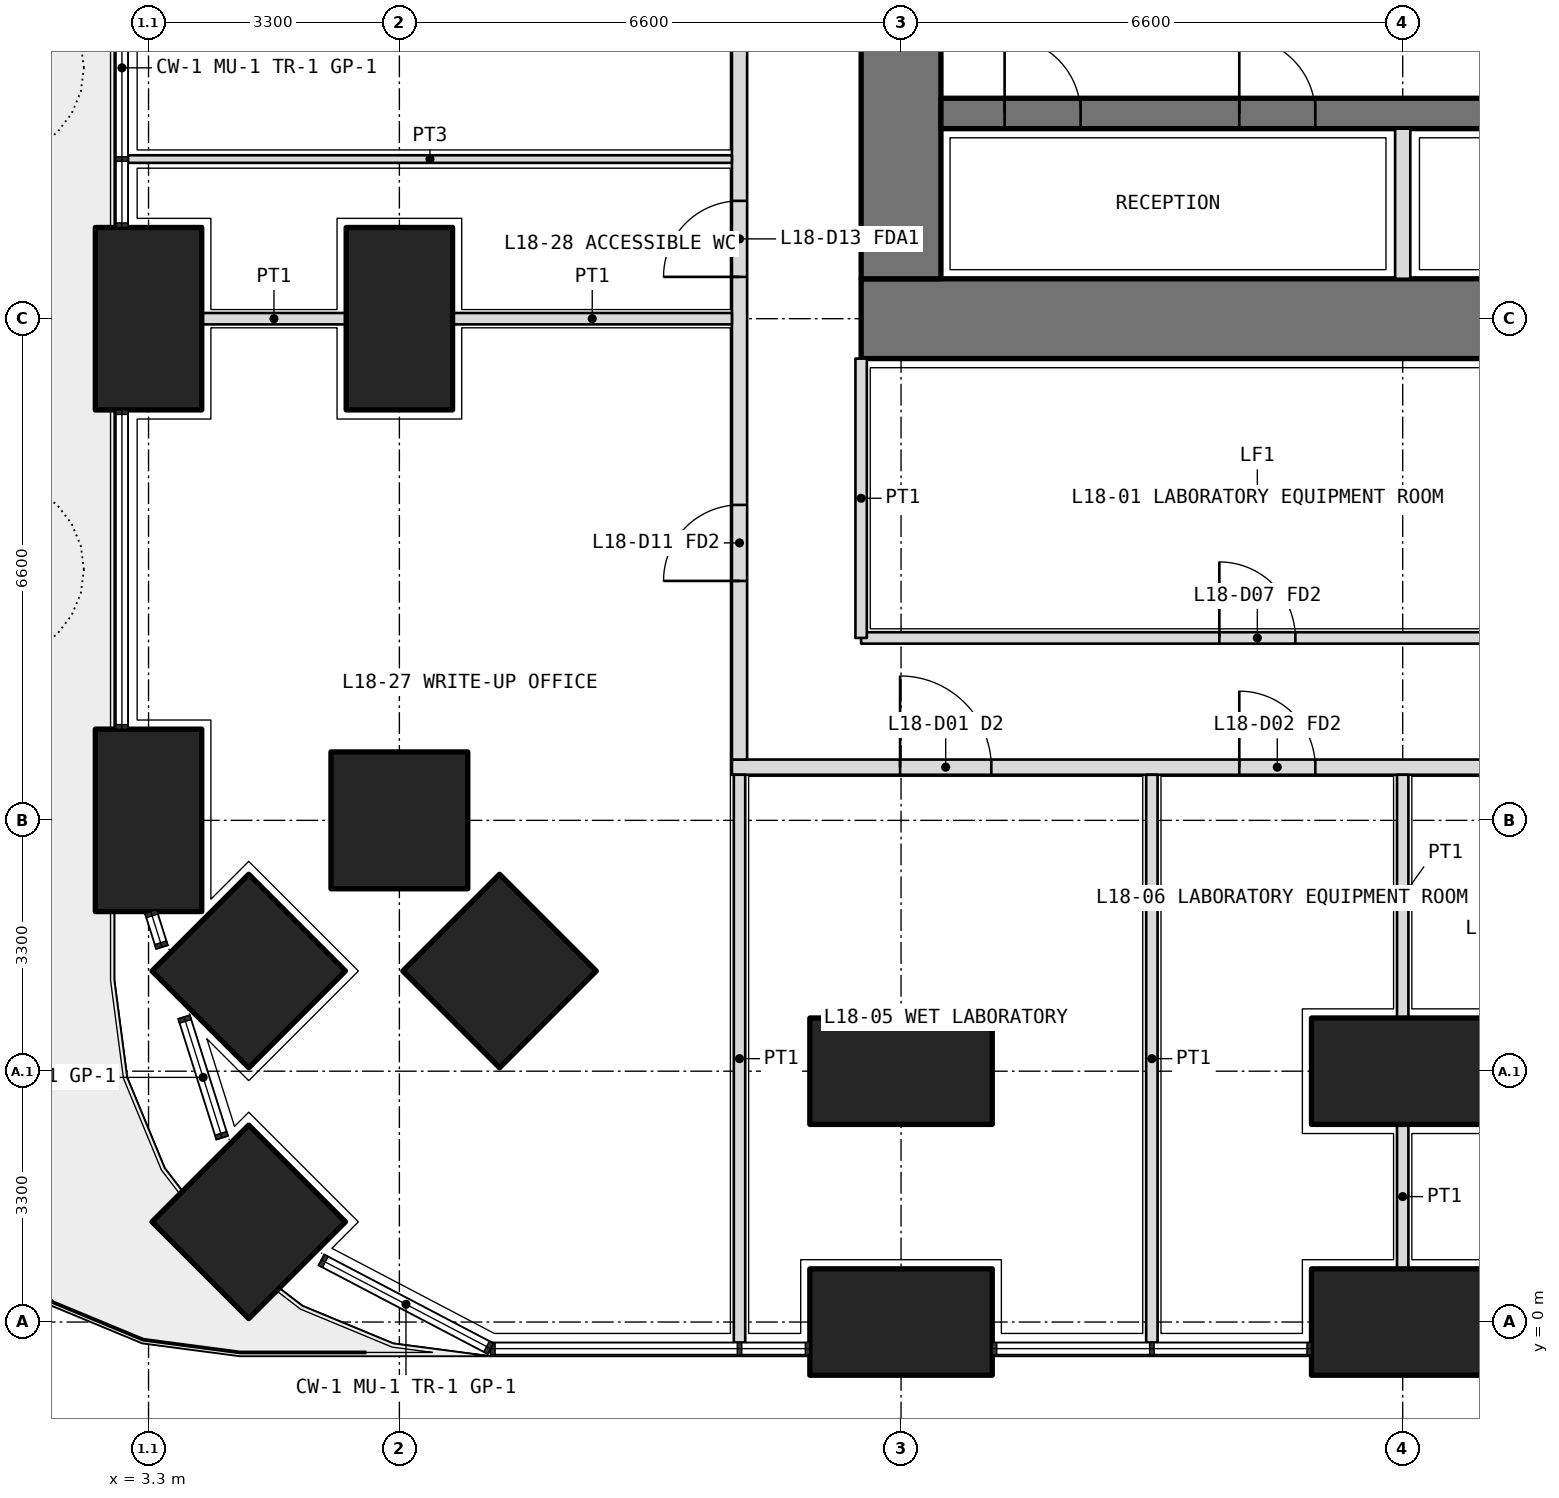
"""IFC4 building model, lengths in metres.
Left out: names, types, materials, properties, quantities, classifications, styles, units other than length and angle.
Written with IfcOpenShell. Run it as: python <this file> out.ifc"""

import sys

from ifc_helpers import new_model, si_unit, direction, frame, frame_2d, origin, origin_2d, place, context, subcontext, project, spatial, rectangle, extrude, element, fill, save


model = new_model("IFC4")
c1 = context("Model", 3, precision=1e-05, world=origin(), true_north=direction((0.0, 1.0)))
c2 = subcontext(c1, "Body", "Model", "MODEL_VIEW")
j1 = project(units=[si_unit("LENGTHUNIT", "METRE"), si_unit("PLANEANGLEUNIT", "RADIAN")], contexts=[c1])
p1 = place(None, origin())
s1 = spatial("IfcSite", under=j1, at=p1, CompositionType="ELEMENT")
p2 = place(p1, origin())
s2 = spatial("IfcBuilding", under=s1, at=p2, CompositionType="ELEMENT")
p3 = place(p2, frame((0.0, 0.0, 82.2)))
s3 = spatial("IfcBuildingStorey", under=s2, at=p3, CompositionType="ELEMENT", Elevation=82.2)
p4 = place(p3, frame((4.618, 1.318, 0.0), z_axis=(0.0, 0.0, 1.0), x_axis=(0.707106781187, 0.707106781187, 0.0)))
e1 = element("IfcColumn", 1, at=p4, inside=s3, PredefinedType="COLUMN", context=c2, shape_type="SweptSolid", body=[
    extrude(rectangle(XDim=1.8, YDim=1.8, at=origin_2d()), origin(), (0.0, 0.0, 1.0), 4.2),
])
for number, where, z_axis, x_axis in (
    (2, (13.2, 0.0, 0.0), (0.0, 0.0, 1.0), (1.0, 0.0, 0.0)),
    (3, (19.8, 0.0, 0.0), (0.0, 0.0, 1.0), (1.0, 0.0, 0.0)),
    (4, (3.3, 6.6, 0.0), (0.0, 0.0, 1.0), (0.0, 1.0, 0.0)),
    (5, (3.3, 13.2, 0.0), (0.0, 0.0, 1.0), (0.0, 1.0, 0.0)),
):
    element("IfcColumn", number, at=place(p3, frame(where, z_axis=z_axis, x_axis=x_axis)), inside=s3, PredefinedType="COLUMN", context=c2, shape_type="SweptSolid", body=[
        extrude(rectangle(XDim=2.4, YDim=1.4, at=origin_2d()), origin(), (0.0, 0.0, 1.0), 4.2),
    ])
for number, where, z_axis, x_axis in (
    (6, (6.6, 6.6, 0.0), (0.0, 0.0, 1.0), (1.0, 0.0, 0.0)),
    (7, (4.618, 4.618, 0.0), (0.0, 0.0, 1.0), (0.707, 0.707, 0.0)),
):
    element("IfcColumn", number, at=place(p3, frame(where, z_axis=z_axis, x_axis=x_axis)), inside=s3, PredefinedType="COLUMN", context=c2, shape_type="SweptSolid", body=[
        extrude(rectangle(XDim=1.8, YDim=1.8, at=origin_2d()), origin(), (0.0, 0.0, 1.0), 4.2),
    ])
for number, where, z_axis, x_axis in (
    (8, (13.2, 3.3, 0.0), (0.0, 0.0, 1.0), (1.0, 0.0, 0.0)),
    (9, (19.8, 3.3, 0.0), (0.0, 0.0, 1.0), (1.0, 0.0, 0.0)),
):
    element("IfcColumn", number, at=place(p3, frame(where, z_axis=z_axis, x_axis=x_axis)), inside=s3, PredefinedType="COLUMN", context=c2, shape_type="SweptSolid", body=[
        extrude(rectangle(XDim=2.4, YDim=1.4, at=origin_2d()), origin(), (0.0, 0.0, 1.0), 4.2),
    ])
p5 = place(p3, frame((7.918, 4.618, 0.0), z_axis=(0.0, 0.0, 1.0), x_axis=(0.707106781187, 0.707106781187, 0.0)))
e10 = element("IfcColumn", 10, at=p5, inside=s3, PredefinedType="COLUMN", context=c2, shape_type="SweptSolid", body=[
    extrude(rectangle(XDim=1.8, YDim=1.8, at=origin_2d()), origin(), (0.0, 0.0, 1.0), 4.2),
])
p6 = place(p3, frame((6.6, 13.2, 0.0), z_axis=(0.0, 0.0, 1.0), x_axis=(0.0, 1.0, 0.0)))
e11 = element("IfcColumn", 11, at=p6, inside=s3, PredefinedType="COLUMN", context=c2, shape_type="SweptSolid", body=[
    extrude(rectangle(XDim=2.4, YDim=1.4, at=origin_2d()), origin(), (0.0, 0.0, 1.0), 4.2),
])
p7 = place(p3, frame((12.675, 13.2, 0.0), z_axis=(0.0, 0.0, 1.0), x_axis=(1.0, 0.0, 0.0)))
e12 = element("IfcWall", 12, at=p7, inside=s3, PredefinedType="SHEAR", context=c2, shape_type="SweptSolid", body=[
    extrude(rectangle(XDim=27.45, YDim=1.05, at=frame_2d((13.725, 0.0))), origin(), (0.0, 0.0, 1.0), 4.2),
])
p8 = place(p3, frame((13.2, 32.475, 0.0), z_axis=(0.0, 0.0, 1.0), x_axis=(0.0, -1.0, 0.0)))
e13 = element("IfcWall", 13, at=p8, inside=s3, PredefinedType="SHEAR", context=c2, shape_type="SweptSolid", body=[
    extrude(rectangle(XDim=18.75, YDim=1.05, at=frame_2d((9.375, 0.0))), origin(), (0.0, 0.0, 1.0), 4.2),
])
p9 = place(p8, frame((14.125, 0.0, 0.0)))
e14 = element("IfcOpeningElement", 14, at=p9, cuts=e13, PredefinedType="OPENING", context=c2, shape_type="SweptSolid", body=[
    extrude(rectangle(XDim=1.6, YDim=2.1, at=frame_2d((0.8, 1.05))), frame((0.0, 0.535, 0.0), z_axis=(0.0, -1.0, 0.0), x_axis=(1.0, 0.0, 0.0)), (0.0, 0.0, 1.0), 1.07),
])
p10 = place(p8, frame((3.325, 0.0, 0.0)))
e15 = element("IfcOpeningElement", 15, at=p10, cuts=e13, PredefinedType="OPENING", context=c2, shape_type="SweptSolid", body=[
    extrude(rectangle(XDim=1.6, YDim=2.1, at=frame_2d((0.8, 1.05))), frame((0.0, 0.535, 0.0), z_axis=(0.0, -1.0, 0.0), x_axis=(1.0, 0.0, 0.0)), (0.0, 0.0, 1.0), 1.07),
])
p11 = place(p3, frame((13.725, 15.9, 0.0), z_axis=(0.0, 0.0, 1.0), x_axis=(1.0, 0.0, 0.0)))
e16 = element("IfcWall", 16, at=p11, inside=s3, PredefinedType="SHEAR", context=c2, shape_type="SweptSolid", body=[
    extrude(rectangle(XDim=25.35, YDim=0.4, at=frame_2d((12.675, 0.0))), origin(), (0.0, 0.0, 1.0), 4.2),
])
p12 = place(p11, frame((0.837, 0.0, 0.0)))
e17 = element("IfcOpeningElement", 17, at=p12, cuts=e16, PredefinedType="OPENING", context=c2, shape_type="SweptSolid", body=[
    extrude(rectangle(XDim=1.0, YDim=2.1, at=frame_2d((0.5, 1.05))), frame((0.0, 0.21, 0.0), z_axis=(0.0, -1.0, 0.0), x_axis=(1.0, 0.0, 0.0)), (0.0, 0.0, 1.0), 0.42),
])
p13 = place(p11, frame((3.925, 0.0, 0.0)))
e18 = element("IfcOpeningElement", 18, at=p13, cuts=e16, PredefinedType="OPENING", context=c2, shape_type="SweptSolid", body=[
    extrude(rectangle(XDim=1.0, YDim=2.1, at=frame_2d((0.5, 1.05))), frame((0.0, 0.21, 0.0), z_axis=(0.0, -1.0, 0.0), x_axis=(1.0, 0.0, 0.0)), (0.0, 0.0, 1.0), 0.42),
])
p14 = place(p11, frame((7.225, 0.0, 0.0)))
e19 = element("IfcOpeningElement", 19, at=p14, cuts=e16, PredefinedType="OPENING", context=c2, shape_type="SweptSolid", body=[
    extrude(rectangle(XDim=1.0, YDim=2.1, at=frame_2d((0.5, 1.05))), frame((0.0, 0.21, 0.0), z_axis=(0.0, -1.0, 0.0), x_axis=(1.0, 0.0, 0.0)), (0.0, 0.0, 1.0), 0.42),
])
p15 = place(p11, frame((10.525, 0.0, 0.0)))
e20 = element("IfcOpeningElement", 20, at=p15, cuts=e16, PredefinedType="OPENING", context=c2, shape_type="SweptSolid", body=[
    extrude(rectangle(XDim=1.0, YDim=2.1, at=frame_2d((0.5, 1.05))), frame((0.0, 0.21, 0.0), z_axis=(0.0, -1.0, 0.0), x_axis=(1.0, 0.0, 0.0)), (0.0, 0.0, 1.0), 0.42),
])
p16 = place(p11, frame((13.775, 0.0, 0.0)))
e21 = element("IfcOpeningElement", 21, at=p16, cuts=e16, PredefinedType="OPENING", context=c2, shape_type="SweptSolid", body=[
    extrude(rectangle(XDim=1.1, YDim=2.1, at=frame_2d((0.55, 1.05))), frame((0.0, 0.21, 0.0), z_axis=(0.0, -1.0, 0.0), x_axis=(1.0, 0.0, 0.0)), (0.0, 0.0, 1.0), 0.42),
])
p17 = place(p11, frame((17.075, 0.0, 0.0)))
e22 = element("IfcOpeningElement", 22, at=p17, cuts=e16, PredefinedType="OPENING", context=c2, shape_type="SweptSolid", body=[
    extrude(rectangle(XDim=1.1, YDim=2.1, at=frame_2d((0.55, 1.05))), frame((0.0, 0.21, 0.0), z_axis=(0.0, -1.0, 0.0), x_axis=(1.0, 0.0, 0.0)), (0.0, 0.0, 1.0), 0.42),
])
p18 = place(p11, frame((20.375, 0.0, 0.0)))
e23 = element("IfcOpeningElement", 23, at=p18, cuts=e16, PredefinedType="OPENING", context=c2, shape_type="SweptSolid", body=[
    extrude(rectangle(XDim=1.1, YDim=2.1, at=frame_2d((0.55, 1.05))), frame((0.0, 0.21, 0.0), z_axis=(0.0, -1.0, 0.0), x_axis=(1.0, 0.0, 0.0)), (0.0, 0.0, 1.0), 0.42),
])
p19 = place(p11, frame((23.462, 0.0, 0.0)))
e24 = element("IfcOpeningElement", 24, at=p19, cuts=e16, PredefinedType="OPENING", context=c2, shape_type="SweptSolid", body=[
    extrude(rectangle(XDim=1.1, YDim=2.1, at=frame_2d((0.55, 1.05))), frame((0.0, 0.21, 0.0), z_axis=(0.0, -1.0, 0.0), x_axis=(1.0, 0.0, 0.0)), (0.0, 0.0, 1.0), 0.42),
])
p20 = place(p3, frame((19.8, 13.725, 0.0), z_axis=(0.0, 0.0, 1.0), x_axis=(0.0, 1.0, 0.0)))
e25 = element("IfcWall", 25, at=p20, inside=s3, PredefinedType="PARTITIONING", context=c2, shape_type="SweptSolid", body=[
    extrude(rectangle(XDim=1.975, YDim=0.2, at=frame_2d((0.987, 0.0))), origin(), (0.0, 0.0, 1.0), 4.2),
])
p21 = place(p3, frame((12.675, 9.0, 0.0), z_axis=(0.0, 0.0, 1.0), x_axis=(1.0, 0.0, 0.0)))
e26 = element("IfcWall", 26, at=p21, inside=s3, PredefinedType="PARTITIONING", context=c2, shape_type="SweptSolid", body=[
    extrude(rectangle(XDim=27.45, YDim=0.15, at=frame_2d((13.725, 0.0))), origin(), (0.0, 0.0, 1.0), 2.85),
])
p22 = place(p21, frame((4.712, 0.0, 0.0)))
e27 = element("IfcOpeningElement", 27, at=p22, cuts=e26, PredefinedType="OPENING", context=c2, shape_type="SweptSolid", body=[
    extrude(rectangle(XDim=1.0, YDim=2.1, at=frame_2d((0.5, 1.05))), frame((0.0, 0.085, 0.0), z_axis=(0.0, -1.0, 0.0), x_axis=(1.0, 0.0, 0.0)), (0.0, 0.0, 1.0), 0.17),
])
p23 = place(p21, frame((11.575, 0.0, 0.0)))
e28 = element("IfcOpeningElement", 28, at=p23, cuts=e26, PredefinedType="OPENING", context=c2, shape_type="SweptSolid", body=[
    extrude(rectangle(XDim=1.0, YDim=2.1, at=frame_2d((0.5, 1.05))), frame((0.0, 0.085, 0.0), z_axis=(0.0, -1.0, 0.0), x_axis=(1.0, 0.0, 0.0)), (0.0, 0.0, 1.0), 0.17),
])
p24 = place(p21, frame((18.175, 0.0, 0.0)))
e29 = element("IfcOpeningElement", 29, at=p24, cuts=e26, PredefinedType="OPENING", context=c2, shape_type="SweptSolid", body=[
    extrude(rectangle(XDim=1.0, YDim=2.1, at=frame_2d((0.5, 1.05))), frame((0.0, 0.085, 0.0), z_axis=(0.0, -1.0, 0.0), x_axis=(1.0, 0.0, 0.0)), (0.0, 0.0, 1.0), 0.17),
])
p25 = place(p21, frame((25.038, 0.0, 0.0)))
e30 = element("IfcOpeningElement", 30, at=p25, cuts=e26, PredefinedType="OPENING", context=c2, shape_type="SweptSolid", body=[
    extrude(rectangle(XDim=1.0, YDim=2.1, at=frame_2d((0.5, 1.05))), frame((0.0, 0.085, 0.0), z_axis=(0.0, -1.0, 0.0), x_axis=(1.0, 0.0, 0.0)), (0.0, 0.0, 1.0), 0.17),
])
p26 = place(p3, frame((12.675, 12.675, 0.0), z_axis=(0.0, 0.0, 1.0), x_axis=(0.0, -1.0, 0.0)))
e31 = element("IfcWall", 31, at=p26, inside=s3, PredefinedType="PARTITIONING", context=c2, shape_type="SweptSolid", body=[
    extrude(rectangle(XDim=3.675, YDim=0.15, at=frame_2d((1.837, 0.0))), origin(), (0.0, 0.0, 1.0), 2.85),
])
p27 = place(p3, frame((10.975, 7.3, 0.0), z_axis=(0.0, 0.0, 1.0), x_axis=(1.0, 0.0, 0.0)))
e32 = element("IfcWall", 32, at=p27, inside=s3, PredefinedType="PARTITIONING", context=c2, shape_type="SweptSolid", body=[
    extrude(rectangle(XDim=30.85, YDim=0.2, at=frame_2d((15.425, 0.0))), origin(), (0.0, 0.0, 1.0), 2.85),
])
p28 = place(p27, frame((2.212, 0.0, 0.0)))
e33 = element("IfcOpeningElement", 33, at=p28, cuts=e32, PredefinedType="OPENING", context=c2, shape_type="SweptSolid", body=[
    extrude(rectangle(XDim=1.2, YDim=2.1, at=frame_2d((0.6, 1.05))), frame((0.0, 0.11, 0.0), z_axis=(0.0, -1.0, 0.0), x_axis=(1.0, 0.0, 0.0)), (0.0, 0.0, 1.0), 0.22),
])
p29 = place(p27, frame((6.675, 0.0, 0.0)))
e34 = element("IfcOpeningElement", 34, at=p29, cuts=e32, PredefinedType="OPENING", context=c2, shape_type="SweptSolid", body=[
    extrude(rectangle(XDim=1.0, YDim=2.1, at=frame_2d((0.5, 1.05))), frame((0.0, 0.11, 0.0), z_axis=(0.0, -1.0, 0.0), x_axis=(1.0, 0.0, 0.0)), (0.0, 0.0, 1.0), 0.22),
])
p30 = place(p27, frame((10.425, 0.0, 0.0)))
e35 = element("IfcOpeningElement", 35, at=p30, cuts=e32, PredefinedType="OPENING", context=c2, shape_type="SweptSolid", body=[
    extrude(rectangle(XDim=1.0, YDim=2.1, at=frame_2d((0.5, 1.05))), frame((0.0, 0.11, 0.0), z_axis=(0.0, -1.0, 0.0), x_axis=(1.0, 0.0, 0.0)), (0.0, 0.0, 1.0), 0.22),
])
p31 = place(p27, frame((13.725, 0.0, 0.0)))
e36 = element("IfcOpeningElement", 36, at=p31, cuts=e32, PredefinedType="OPENING", context=c2, shape_type="SweptSolid", body=[
    extrude(rectangle(XDim=1.0, YDim=2.1, at=frame_2d((0.5, 1.05))), frame((0.0, 0.11, 0.0), z_axis=(0.0, -1.0, 0.0), x_axis=(1.0, 0.0, 0.0)), (0.0, 0.0, 1.0), 0.22),
])
p32 = place(p27, frame((16.475, 0.0, 0.0)))
e37 = element("IfcOpeningElement", 37, at=p32, cuts=e32, PredefinedType="OPENING", context=c2, shape_type="SweptSolid", body=[
    extrude(rectangle(XDim=1.2, YDim=2.1, at=frame_2d((0.6, 1.05))), frame((0.0, 0.11, 0.0), z_axis=(0.0, -1.0, 0.0), x_axis=(1.0, 0.0, 0.0)), (0.0, 0.0, 1.0), 0.22),
])
p33 = place(p27, frame((24.238, 0.0, 0.0)))
e38 = element("IfcOpeningElement", 38, at=p33, cuts=e32, PredefinedType="OPENING", context=c2, shape_type="SweptSolid", body=[
    extrude(rectangle(XDim=1.0, YDim=2.1, at=frame_2d((0.5, 1.05))), frame((0.0, 0.11, 0.0), z_axis=(0.0, -1.0, 0.0), x_axis=(1.0, 0.0, 0.0)), (0.0, 0.0, 1.0), 0.22),
])
p34 = place(p3, frame((11.075, 7.4, 0.0), z_axis=(0.0, 0.0, 1.0), x_axis=(0.0, 1.0, 0.0)))
e39 = element("IfcWall", 39, at=p34, inside=s3, PredefinedType="PARTITIONING", context=c2, shape_type="SweptSolid", body=[
    extrude(rectangle(XDim=19.0, YDim=0.2, at=frame_2d((9.5, 0.0))), origin(), (0.0, 0.0, 1.0), 2.85),
])
p35 = place(p34, frame((2.35, 0.0, 0.0)))
e40 = element("IfcOpeningElement", 40, at=p35, cuts=e39, PredefinedType="OPENING", context=c2, shape_type="SweptSolid", body=[
    extrude(rectangle(XDim=1.0, YDim=2.1, at=frame_2d((0.5, 1.05))), frame((0.0, 0.11, 0.0), z_axis=(0.0, -1.0, 0.0), x_axis=(1.0, 0.0, 0.0)), (0.0, 0.0, 1.0), 0.22),
])
p36 = place(p34, frame((6.35, 0.0, 0.0)))
e41 = element("IfcOpeningElement", 41, at=p36, cuts=e39, PredefinedType="OPENING", context=c2, shape_type="SweptSolid", body=[
    extrude(rectangle(XDim=1.0, YDim=2.1, at=frame_2d((0.5, 1.05))), frame((0.0, 0.11, 0.0), z_axis=(0.0, -1.0, 0.0), x_axis=(1.0, 0.0, 0.0)), (0.0, 0.0, 1.0), 0.22),
])
p37 = place(p34, frame((9.425, 0.0, 0.0)))
e42 = element("IfcOpeningElement", 42, at=p37, cuts=e39, PredefinedType="OPENING", context=c2, shape_type="SweptSolid", body=[
    extrude(rectangle(XDim=0.9, YDim=2.1, at=frame_2d((0.45, 1.05))), frame((0.0, 0.11, 0.0), z_axis=(0.0, -1.0, 0.0), x_axis=(1.0, 0.0, 0.0)), (0.0, 0.0, 1.0), 0.22),
])
p38 = place(p34, frame((13.275, 0.0, 0.0)))
e43 = element("IfcOpeningElement", 43, at=p38, cuts=e39, PredefinedType="OPENING", context=c2, shape_type="SweptSolid", body=[
    extrude(rectangle(XDim=0.9, YDim=2.1, at=frame_2d((0.45, 1.05))), frame((0.0, 0.11, 0.0), z_axis=(0.0, -1.0, 0.0), x_axis=(1.0, 0.0, 0.0)), (0.0, 0.0, 1.0), 0.22),
])
p39 = place(p34, frame((16.8, 0.0, 0.0)))
e44 = element("IfcOpeningElement", 44, at=p39, cuts=e39, PredefinedType="OPENING", context=c2, shape_type="SweptSolid", body=[
    extrude(rectangle(XDim=1.0, YDim=2.1, at=frame_2d((0.5, 1.05))), frame((0.0, 0.11, 0.0), z_axis=(0.0, -1.0, 0.0), x_axis=(1.0, 0.0, 0.0)), (0.0, 0.0, 1.0), 0.22),
])
for number, where, z_axis, x_axis in (
    (45, (11.075, -0.27, 0.0), (0.0, 0.0, 1.0), (0.0, 1.0, 0.0)),
    (46, (16.5, -0.27, 0.0), (0.0, 0.0, 1.0), (0.0, 1.0, 0.0)),
):
    element("IfcWall", number, at=place(p3, frame(where, z_axis=z_axis, x_axis=x_axis)), inside=s3, PredefinedType="PARTITIONING", context=c2, shape_type="SweptSolid", body=[
        extrude(rectangle(XDim=7.47, YDim=0.15, at=frame_2d((3.735, 0.0))), origin(), (0.0, 0.0, 1.0), 2.7),
    ])
p40 = place(p3, frame((19.8, 0.7, 0.0), z_axis=(0.0, 0.0, 1.0), x_axis=(0.0, 1.0, 0.0)))
e47 = element("IfcWall", 47, at=p40, inside=s3, PredefinedType="PARTITIONING", context=c2, shape_type="SweptSolid", body=[
    extrude(rectangle(XDim=1.9, YDim=0.15, at=frame_2d((0.95, 0.0))), origin(), (0.0, 0.0, 1.0), 2.85),
])
p41 = place(p3, frame((19.8, 4.0, 0.0), z_axis=(0.0, 0.0, 1.0), x_axis=(0.0, 1.0, 0.0)))
e48 = element("IfcWall", 48, at=p41, inside=s3, PredefinedType="PARTITIONING", context=c2, shape_type="SweptSolid", body=[
    extrude(rectangle(XDim=3.2, YDim=0.15, at=frame_2d((1.6, 0.0))), origin(), (0.0, 0.0, 1.0), 2.85),
])
p42 = place(p3, frame((3.03, 15.3, 0.0), z_axis=(0.0, 0.0, 1.0), x_axis=(1.0, 0.0, 0.0)))
e49 = element("IfcWall", 49, at=p42, inside=s3, PredefinedType="PARTITIONING", context=c2, shape_type="SweptSolid", body=[
    extrude(rectangle(XDim=7.945, YDim=0.1, at=frame_2d((3.973, 0.0))), origin(), (0.0, 0.0, 1.0), 2.7),
])
p43 = place(p3, frame((4.0, 13.2, 0.0), z_axis=(0.0, 0.0, 1.0), x_axis=(1.0, 0.0, 0.0)))
e50 = element("IfcWall", 50, at=p43, inside=s3, PredefinedType="PARTITIONING", context=c2, shape_type="SweptSolid", body=[
    extrude(rectangle(XDim=1.9, YDim=0.15, at=frame_2d((0.95, 0.0))), origin(), (0.0, 0.0, 1.0), 2.85),
])
p44 = place(p3, frame((7.3, 13.2, 0.0), z_axis=(0.0, 0.0, 1.0), x_axis=(1.0, 0.0, 0.0)))
e51 = element("IfcWall", 51, at=p44, inside=s3, PredefinedType="PARTITIONING", context=c2, shape_type="SweptSolid", body=[
    extrude(rectangle(XDim=3.675, YDim=0.15, at=frame_2d((1.837, 0.0))), origin(), (0.0, 0.0, 1.0), 2.85),
])
p45 = place(p22, origin())
e52 = element("IfcDoor", 52, at=p45, inside=s3, OperationType="SINGLE_SWING_LEFT", PredefinedType="DOOR", context=c2, shape_type="SweptSolid", body=[
    extrude(rectangle(XDim=1.0, YDim=2.1, at=frame_2d((0.5, 1.05))), frame((0.0, 0.025, 0.0), z_axis=(0.0, -1.0, 0.0), x_axis=(1.0, 0.0, 0.0)), (0.0, 0.0, 1.0), 0.05),
])
fill(e27, e52)
p46 = place(p28, origin())
e53 = element("IfcDoor", 53, at=p46, inside=s3, OperationType="DOUBLE_DOOR_SINGLE_SWING", PredefinedType="DOOR", context=c2, shape_type="SweptSolid", body=[
    extrude(rectangle(XDim=1.2, YDim=2.1, at=frame_2d((0.6, 1.05))), frame((0.0, 0.025, 0.0), z_axis=(0.0, -1.0, 0.0), x_axis=(1.0, 0.0, 0.0)), (0.0, 0.0, 1.0), 0.05),
])
fill(e33, e53)
p47 = place(p29, origin())
e54 = element("IfcDoor", 54, at=p47, inside=s3, OperationType="SINGLE_SWING_LEFT", PredefinedType="DOOR", context=c2, shape_type="SweptSolid", body=[
    extrude(rectangle(XDim=1.0, YDim=2.1, at=frame_2d((0.5, 1.05))), frame((0.0, 0.025, 0.0), z_axis=(0.0, -1.0, 0.0), x_axis=(1.0, 0.0, 0.0)), (0.0, 0.0, 1.0), 0.05),
])
fill(e34, e54)
p48 = place(p35, origin())
e55 = element("IfcDoor", 55, at=p48, inside=s3, OperationType="SINGLE_SWING_LEFT", PredefinedType="DOOR", context=c2, shape_type="SweptSolid", body=[
    extrude(rectangle(XDim=1.0, YDim=2.1, at=frame_2d((0.5, 1.05))), frame((0.0, 0.025, 0.0), z_axis=(0.0, -1.0, 0.0), x_axis=(1.0, 0.0, 0.0)), (0.0, 0.0, 1.0), 0.05),
])
fill(e40, e55)
p49 = place(p36, origin())
e56 = element("IfcDoor", 56, at=p49, inside=s3, OperationType="SINGLE_SWING_LEFT", PredefinedType="DOOR", context=c2, shape_type="SweptSolid", body=[
    extrude(rectangle(XDim=1.0, YDim=2.1, at=frame_2d((0.5, 1.05))), frame((0.0, 0.025, 0.0), z_axis=(0.0, -1.0, 0.0), x_axis=(1.0, 0.0, 0.0)), (0.0, 0.0, 1.0), 0.05),
])
fill(e41, e56)
p50 = place(p12, origin())
e57 = element("IfcDoor", 57, at=p50, inside=s3, OperationType="SINGLE_SWING_LEFT", PredefinedType="DOOR", context=c2, shape_type="SweptSolid", body=[
    extrude(rectangle(XDim=1.0, YDim=2.1, at=frame_2d((0.5, 1.05))), frame((0.0, 0.025, 0.0), z_axis=(0.0, -1.0, 0.0), x_axis=(1.0, 0.0, 0.0)), (0.0, 0.0, 1.0), 0.05),
])
fill(e17, e57)
p51 = place(p13, origin())
e58 = element("IfcDoor", 58, at=p51, inside=s3, OperationType="SINGLE_SWING_LEFT", PredefinedType="DOOR", context=c2, shape_type="SweptSolid", body=[
    extrude(rectangle(XDim=1.0, YDim=2.1, at=frame_2d((0.5, 1.05))), frame((0.0, 0.025, 0.0), z_axis=(0.0, -1.0, 0.0), x_axis=(1.0, 0.0, 0.0)), (0.0, 0.0, 1.0), 0.05),
])
fill(e18, e58)
save(model, sys.argv[1])
